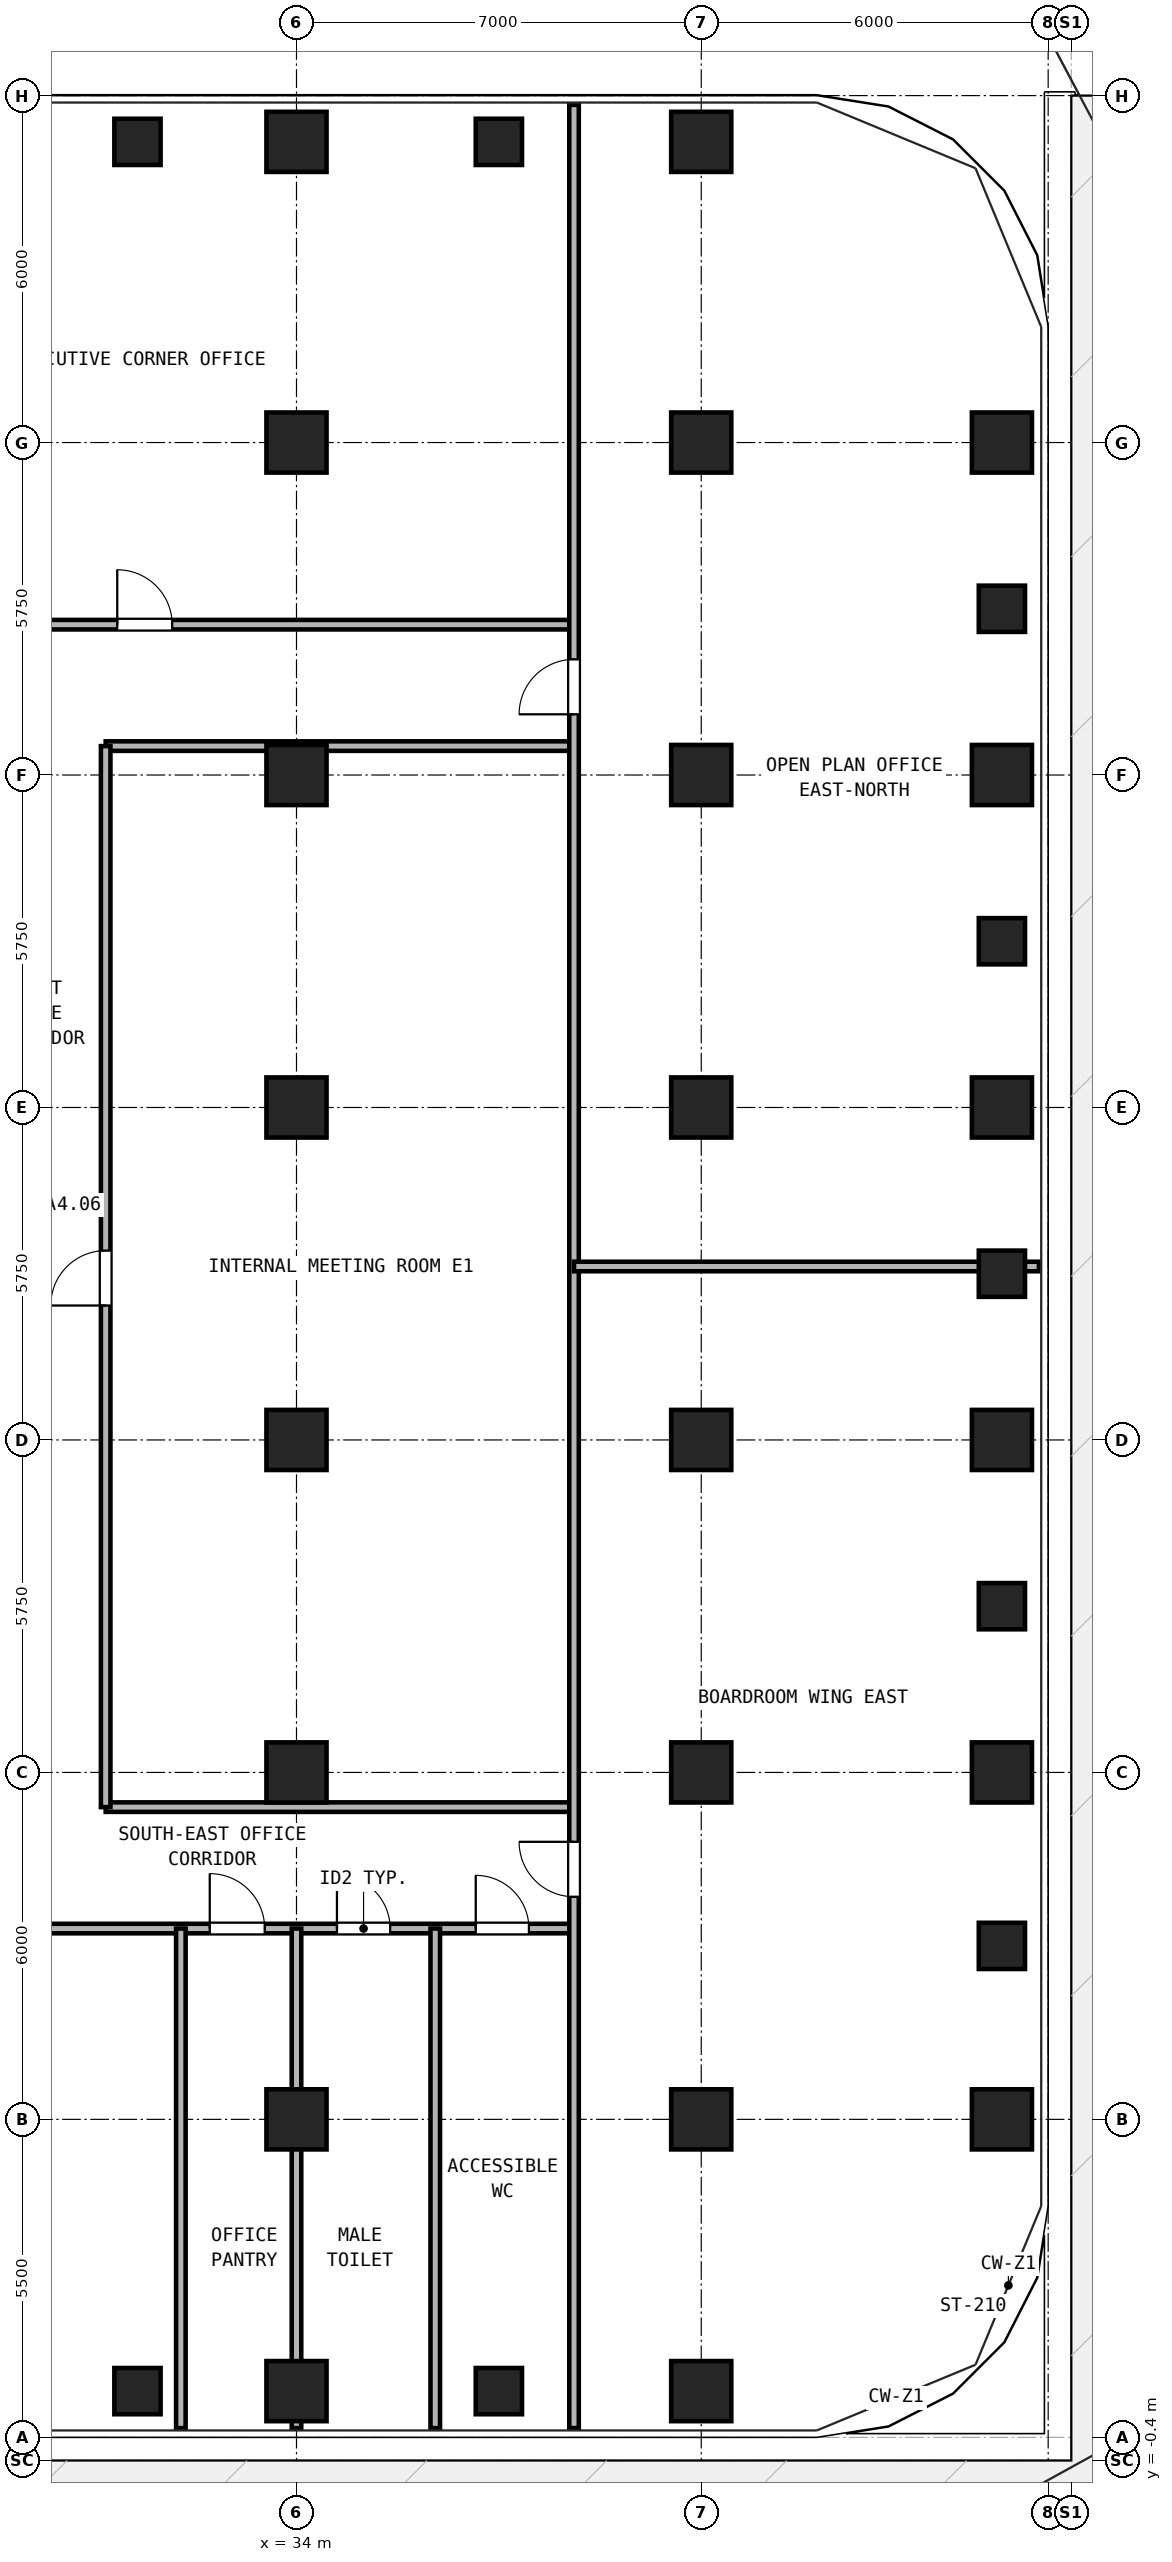
"""IFC4 building model, lengths in metres.
Left out: names, types, materials, properties, quantities, classifications, styles, units other than length and angle.
Written with IfcOpenShell. Run it as: python <this file> out.ifc"""

import sys

from ifc_helpers import new_model, si_unit, direction, frame, frame_2d, origin, origin_2d, place, context, subcontext, project, spatial, rectangle, hollow_rectangle, extrude, source, transform, mapped, element, fill, save


model = new_model("IFC4")
c1 = context("Model", 3, precision=1e-05, world=origin(), true_north=direction((0.0, 1.0)))
c2 = subcontext(c1, "Body", "Model", "MODEL_VIEW")
j1 = project(units=[si_unit("LENGTHUNIT", "METRE"), si_unit("PLANEANGLEUNIT", "RADIAN")], contexts=[c1])
p1 = place(None, origin())
s1 = spatial("IfcSite", under=j1, at=p1, CompositionType="ELEMENT")
p2 = place(p1, origin())
s2 = spatial("IfcBuilding", under=s1, at=p2, CompositionType="ELEMENT")
p3 = place(p2, frame((0.0, 0.0, 22.5)))
s3 = spatial("IfcBuildingStorey", under=s2, at=p3, CompositionType="ELEMENT", Elevation=22.5)
m1 = source(origin(), c2, "Body", "SweptSolid", [
    extrude(hollow_rectangle(XDim=1.04, YDim=1.04, WallThickness=0.065, at=origin_2d()), origin(), (0.0, 0.0, 1.0), 3.32),
])
for number, where, z_axis, x_axis in (
    (1, (34.0, 0.8, 0.0), (0.0, 0.0, 1.0), (1.0, 0.0, 0.0)),
    (2, (34.0, 39.7, 0.0), (0.0, 0.0, 1.0), (1.0, 0.0, 0.0)),
    (3, (41.0, 0.8, 0.0), (0.0, 0.0, 1.0), (1.0, 0.0, 0.0)),
    (4, (41.0, 39.7, 0.0), (0.0, 0.0, 1.0), (1.0, 0.0, 0.0)),
    (5, (46.2, 5.5, 0.0), (0.0, 0.0, 1.0), (1.0, 0.0, 0.0)),
    (6, (46.2, 11.5, 0.0), (0.0, 0.0, 1.0), (1.0, 0.0, 0.0)),
    (7, (46.2, 17.25, 0.0), (0.0, 0.0, 1.0), (1.0, 0.0, 0.0)),
    (8, (46.2, 23.0, 0.0), (0.0, 0.0, 1.0), (1.0, 0.0, 0.0)),
    (9, (46.2, 28.75, 0.0), (0.0, 0.0, 1.0), (1.0, 0.0, 0.0)),
    (10, (46.2, 34.5, 0.0), (0.0, 0.0, 1.0), (1.0, 0.0, 0.0)),
    (11, (34.0, 5.5, 0.0), (0.0, 0.0, 1.0), (1.0, 0.0, 0.0)),
    (12, (34.0, 11.5, 0.0), (0.0, 0.0, 1.0), (1.0, 0.0, 0.0)),
    (13, (34.0, 17.25, 0.0), (0.0, 0.0, 1.0), (1.0, 0.0, 0.0)),
    (14, (34.0, 23.0, 0.0), (0.0, 0.0, 1.0), (1.0, 0.0, 0.0)),
    (15, (34.0, 28.75, 0.0), (0.0, 0.0, 1.0), (1.0, 0.0, 0.0)),
    (16, (34.0, 34.5, 0.0), (0.0, 0.0, 1.0), (1.0, 0.0, 0.0)),
    (17, (41.0, 5.5, 0.0), (0.0, 0.0, 1.0), (1.0, 0.0, 0.0)),
    (18, (41.0, 11.5, 0.0), (0.0, 0.0, 1.0), (1.0, 0.0, 0.0)),
    (19, (41.0, 17.25, 0.0), (0.0, 0.0, 1.0), (1.0, 0.0, 0.0)),
    (20, (41.0, 23.0, 0.0), (0.0, 0.0, 1.0), (1.0, 0.0, 0.0)),
    (21, (41.0, 28.75, 0.0), (0.0, 0.0, 1.0), (1.0, 0.0, 0.0)),
    (22, (41.0, 34.5, 0.0), (0.0, 0.0, 1.0), (1.0, 0.0, 0.0)),
):
    element("IfcColumn", number, at=place(p3, frame(where, z_axis=z_axis, x_axis=x_axis)), inside=s3, PredefinedType="COLUMN", context=c2, shape_type="MappedRepresentation", body=[
        mapped(m1, transform((0.0, 0.0, 0.0), x_axis=(1.0, 0.0, 0.0), y_axis=(0.0, 1.0, 0.0), z_axis=(0.0, 0.0, 1.0), scale=1.0)),
    ])
m2 = source(origin(), c2, "Body", "SweptSolid", [
    extrude(hollow_rectangle(XDim=0.8, YDim=0.8, WallThickness=0.045, at=origin_2d()), origin(), (0.0, 0.0, 1.0), 3.68),
])
for number, where, z_axis, x_axis in (
    (23, (31.25, 0.8, -0.36), (0.0, 0.0, 1.0), (1.0, 0.0, 0.0)),
    (24, (31.25, 39.7, -0.36), (0.0, 0.0, 1.0), (1.0, 0.0, 0.0)),
    (25, (37.5, 0.8, -0.36), (0.0, 0.0, 1.0), (1.0, 0.0, 0.0)),
    (26, (37.5, 39.7, -0.36), (0.0, 0.0, 1.0), (1.0, 0.0, 0.0)),
    (27, (46.2, 8.5, -0.36), (0.0, 0.0, 1.0), (1.0, 0.0, 0.0)),
    (28, (46.2, 14.375, -0.36), (0.0, 0.0, 1.0), (1.0, 0.0, 0.0)),
    (29, (46.2, 20.125, -0.36), (0.0, 0.0, 1.0), (1.0, 0.0, 0.0)),
    (30, (46.2, 25.875, -0.36), (0.0, 0.0, 1.0), (1.0, 0.0, 0.0)),
    (31, (46.2, 31.625, -0.36), (0.0, 0.0, 1.0), (1.0, 0.0, 0.0)),
):
    element("IfcColumn", number, at=place(p3, frame(where, z_axis=z_axis, x_axis=x_axis)), inside=s3, PredefinedType="COLUMN", context=c2, shape_type="MappedRepresentation", body=[
        mapped(m2, transform((0.0, 0.0, 0.0), x_axis=(1.0, 0.0, 0.0), y_axis=(0.0, 1.0, 0.0), z_axis=(0.0, 0.0, 1.0), scale=1.0)),
    ])
p4 = place(p3, frame((8.2, 8.8, 0.0), z_axis=(0.0, 0.0, 1.0), x_axis=(1.0, 0.0, 0.0)))
e32 = element("IfcWall", 32, at=p4, inside=s3, PredefinedType="PARTITIONING", context=c2, shape_type="SweptSolid", body=[
    extrude(rectangle(XDim=30.6, YDim=0.165, at=frame_2d((15.3, 0.0))), origin(), (0.0, 0.0, 1.0), 3.32),
])
p5 = place(p4, frame((7.15, 0.0, 0.0)))
e33 = element("IfcOpeningElement", 33, at=p5, cuts=e32, PredefinedType="OPENING", context=c2, shape_type="SweptSolid", body=[
    extrude(rectangle(XDim=0.95, YDim=2.15, at=frame_2d((0.475, 1.075))), frame((0.0, 0.093, 0.0), z_axis=(0.0, -1.0, 0.0), x_axis=(1.0, 0.0, 0.0)), (0.0, 0.0, 1.0), 0.185),
])
p6 = place(p4, frame((19.05, 0.0, 0.0)))
e34 = element("IfcOpeningElement", 34, at=p6, cuts=e32, PredefinedType="OPENING", context=c2, shape_type="SweptSolid", body=[
    extrude(rectangle(XDim=0.95, YDim=2.15, at=frame_2d((0.475, 1.075))), frame((0.0, 0.093, 0.0), z_axis=(0.0, -1.0, 0.0), x_axis=(1.0, 0.0, 0.0)), (0.0, 0.0, 1.0), 0.185),
])
p7 = place(p4, frame((24.3, 0.0, 0.0)))
e35 = element("IfcOpeningElement", 35, at=p7, cuts=e32, PredefinedType="OPENING", context=c2, shape_type="SweptSolid", body=[
    extrude(rectangle(XDim=0.95, YDim=2.15, at=frame_2d((0.475, 1.075))), frame((0.0, 0.093, 0.0), z_axis=(0.0, -1.0, 0.0), x_axis=(1.0, 0.0, 0.0)), (0.0, 0.0, 1.0), 0.185),
])
p8 = place(p4, frame((26.5, 0.0, 0.0)))
e36 = element("IfcOpeningElement", 36, at=p8, cuts=e32, PredefinedType="OPENING", context=c2, shape_type="SweptSolid", body=[
    extrude(rectangle(XDim=0.92, YDim=2.1, at=frame_2d((0.46, 1.05))), frame((0.0, 0.093, 0.0), z_axis=(0.0, -1.0, 0.0), x_axis=(1.0, 0.0, 0.0)), (0.0, 0.0, 1.0), 0.185),
])
p9 = place(p4, frame((28.9, 0.0, 0.0)))
e37 = element("IfcOpeningElement", 37, at=p9, cuts=e32, PredefinedType="OPENING", context=c2, shape_type="SweptSolid", body=[
    extrude(rectangle(XDim=0.92, YDim=2.1, at=frame_2d((0.46, 1.05))), frame((0.0, 0.093, 0.0), z_axis=(0.0, -1.0, 0.0), x_axis=(1.0, 0.0, 0.0)), (0.0, 0.0, 1.0), 0.185),
])
p10 = place(p3, frame((8.2, 31.35, 0.0), z_axis=(0.0, 0.0, 1.0), x_axis=(1.0, 0.0, 0.0)))
e38 = element("IfcWall", 38, at=p10, inside=s3, PredefinedType="PARTITIONING", context=c2, shape_type="SweptSolid", body=[
    extrude(rectangle(XDim=30.6, YDim=0.165, at=frame_2d((15.3, 0.0))), origin(), (0.0, 0.0, 1.0), 3.32),
])
p11 = place(p10, frame((7.4, 0.0, 0.0)))
e39 = element("IfcOpeningElement", 39, at=p11, cuts=e38, PredefinedType="OPENING", context=c2, shape_type="SweptSolid", body=[
    extrude(rectangle(XDim=0.95, YDim=2.15, at=frame_2d((0.475, 1.075))), frame((0.0, 0.093, 0.0), z_axis=(0.0, -1.0, 0.0), x_axis=(1.0, 0.0, 0.0)), (0.0, 0.0, 1.0), 0.185),
])
p12 = place(p10, frame((22.7, 0.0, 0.0)))
e40 = element("IfcOpeningElement", 40, at=p12, cuts=e38, PredefinedType="OPENING", context=c2, shape_type="SweptSolid", body=[
    extrude(rectangle(XDim=0.95, YDim=2.15, at=frame_2d((0.475, 1.075))), frame((0.0, 0.093, 0.0), z_axis=(0.0, -1.0, 0.0), x_axis=(1.0, 0.0, 0.0)), (0.0, 0.0, 1.0), 0.185),
])
for number, where, z_axis, x_axis in (
    (41, (30.7, 10.9, 0.0), (0.0, 0.0, 1.0), (1.0, 0.0, 0.0)),
    (42, (30.7, 29.25, 0.0), (0.0, 0.0, 1.0), (1.0, 0.0, 0.0)),
):
    element("IfcWall", number, at=place(p3, frame(where, z_axis=z_axis, x_axis=x_axis)), inside=s3, PredefinedType="PARTITIONING", context=c2, shape_type="SweptSolid", body=[
        extrude(rectangle(XDim=8.1, YDim=0.165, at=frame_2d((4.05, 0.0))), origin(), (0.0, 0.0, 1.0), 3.32),
    ])
p13 = place(p3, frame((30.7, 10.9, 0.0), z_axis=(0.0, 0.0, 1.0), x_axis=(0.0, 1.0, 0.0)))
e43 = element("IfcWall", 43, at=p13, inside=s3, PredefinedType="PARTITIONING", context=c2, shape_type="SweptSolid", body=[
    extrude(rectangle(XDim=18.35, YDim=0.165, at=frame_2d((9.175, 0.0))), origin(), (0.0, 0.0, 1.0), 3.32),
])
p14 = place(p13, frame((8.675, 0.0, 0.0)))
e44 = element("IfcOpeningElement", 44, at=p14, cuts=e43, PredefinedType="OPENING", context=c2, shape_type="SweptSolid", body=[
    extrude(rectangle(XDim=0.95, YDim=2.15, at=frame_2d((0.475, 1.075))), frame((0.0, 0.093, 0.0), z_axis=(0.0, -1.0, 0.0), x_axis=(1.0, 0.0, 0.0)), (0.0, 0.0, 1.0), 0.185),
])
p15 = place(p3, frame((38.8, 0.16, 0.0), z_axis=(0.0, 0.0, 1.0), x_axis=(0.0, 1.0, 0.0)))
e45 = element("IfcWall", 45, at=p15, inside=s3, PredefinedType="PARTITIONING", context=c2, shape_type="SweptSolid", body=[
    extrude(rectangle(XDim=40.18, YDim=0.165, at=frame_2d((20.09, 0.0))), origin(), (0.0, 0.0, 1.0), 3.32),
])
p16 = place(p15, frame((9.19, 0.0, 0.0)))
e46 = element("IfcOpeningElement", 46, at=p16, cuts=e45, PredefinedType="OPENING", context=c2, shape_type="SweptSolid", body=[
    extrude(rectangle(XDim=0.95, YDim=2.15, at=frame_2d((0.475, 1.075))), frame((0.0, 0.093, 0.0), z_axis=(0.0, -1.0, 0.0), x_axis=(1.0, 0.0, 0.0)), (0.0, 0.0, 1.0), 0.185),
])
p17 = place(p15, frame((29.64, 0.0, 0.0)))
e47 = element("IfcOpeningElement", 47, at=p17, cuts=e45, PredefinedType="OPENING", context=c2, shape_type="SweptSolid", body=[
    extrude(rectangle(XDim=0.95, YDim=2.15, at=frame_2d((0.475, 1.075))), frame((0.0, 0.093, 0.0), z_axis=(0.0, -1.0, 0.0), x_axis=(1.0, 0.0, 0.0)), (0.0, 0.0, 1.0), 0.185),
])
p18 = place(p3, frame((32.0, 0.16, 0.0), z_axis=(0.0, 0.0, 1.0), x_axis=(0.0, 1.0, 0.0)))
e48 = element("IfcWall", 48, at=p18, inside=s3, PredefinedType="PARTITIONING", context=c2, shape_type="SweptSolid", body=[
    extrude(rectangle(XDim=8.64, YDim=0.165, at=frame_2d((4.32, 0.0))), origin(), (0.0, 0.0, 1.0), 3.32),
])
p19 = place(p3, frame((34.0, 0.16, 0.0), z_axis=(0.0, 0.0, 1.0), x_axis=(0.0, 1.0, 0.0)))
e49 = element("IfcWall", 49, at=p19, inside=s3, PredefinedType="PARTITIONING", context=c2, shape_type="SweptSolid", body=[
    extrude(rectangle(XDim=8.64, YDim=0.165, at=frame_2d((4.32, 0.0))), origin(), (0.0, 0.0, 1.0), 2.539),
])
p20 = place(p3, frame((36.4, 0.16, 0.0), z_axis=(0.0, 0.0, 1.0), x_axis=(0.0, 1.0, 0.0)))
e50 = element("IfcWall", 50, at=p20, inside=s3, PredefinedType="PARTITIONING", context=c2, shape_type="SweptSolid", body=[
    extrude(rectangle(XDim=8.64, YDim=0.165, at=frame_2d((4.32, 0.0))), origin(), (0.0, 0.0, 1.0), 3.32),
])
p21 = place(p3, frame((38.8, 20.25, 0.0), z_axis=(0.0, 0.0, 1.0), x_axis=(1.0, 0.0, 0.0)))
e51 = element("IfcWall", 51, at=p21, inside=s3, PredefinedType="PARTITIONING", context=c2, shape_type="SweptSolid", body=[
    extrude(rectangle(XDim=8.04, YDim=0.165, at=frame_2d((4.02, 0.0))), origin(), (0.0, 0.0, 1.0), 2.898),
])
p22 = place(p7, frame((0.95, 0.0, 0.0), z_axis=(0.0, 0.0, 1.0), x_axis=(-1.0, 0.0, 0.0)))
e52 = element("IfcDoor", 52, at=p22, inside=s3, OperationType="SINGLE_SWING_LEFT", PredefinedType="DOOR", context=c2, shape_type="SweptSolid", body=[
    extrude(rectangle(XDim=0.95, YDim=2.15, at=frame_2d((0.475, 1.075))), frame((0.0, 0.025, 0.0), z_axis=(0.0, -1.0, 0.0), x_axis=(1.0, 0.0, 0.0)), (0.0, 0.0, 1.0), 0.05),
])
fill(e35, e52)
p23 = place(p8, frame((0.92, 0.0, 0.0), z_axis=(0.0, 0.0, 1.0), x_axis=(-1.0, 0.0, 0.0)))
e53 = element("IfcDoor", 53, at=p23, inside=s3, OperationType="SINGLE_SWING_LEFT", PredefinedType="DOOR", context=c2, shape_type="SweptSolid", body=[
    extrude(rectangle(XDim=0.92, YDim=2.1, at=frame_2d((0.46, 1.05))), frame((0.0, 0.025, 0.0), z_axis=(0.0, -1.0, 0.0), x_axis=(1.0, 0.0, 0.0)), (0.0, 0.0, 1.0), 0.05),
])
fill(e36, e53)
p24 = place(p9, frame((0.92, 0.0, 0.0), z_axis=(0.0, 0.0, 1.0), x_axis=(-1.0, 0.0, 0.0)))
e54 = element("IfcDoor", 54, at=p24, inside=s3, OperationType="SINGLE_SWING_LEFT", PredefinedType="DOOR", context=c2, shape_type="SweptSolid", body=[
    extrude(rectangle(XDim=0.92, YDim=2.1, at=frame_2d((0.46, 1.05))), frame((0.0, 0.025, 0.0), z_axis=(0.0, -1.0, 0.0), x_axis=(1.0, 0.0, 0.0)), (0.0, 0.0, 1.0), 0.05),
])
fill(e37, e54)
p25 = place(p12, origin())
e55 = element("IfcDoor", 55, at=p25, inside=s3, OperationType="SINGLE_SWING_LEFT", PredefinedType="DOOR", context=c2, shape_type="SweptSolid", body=[
    extrude(rectangle(XDim=0.95, YDim=2.15, at=frame_2d((0.475, 1.075))), frame((0.0, 0.025, 0.0), z_axis=(0.0, -1.0, 0.0), x_axis=(1.0, 0.0, 0.0)), (0.0, 0.0, 1.0), 0.05),
])
fill(e40, e55)
p26 = place(p16, origin())
e56 = element("IfcDoor", 56, at=p26, inside=s3, OperationType="SINGLE_SWING_RIGHT", PredefinedType="DOOR", context=c2, shape_type="SweptSolid", body=[
    extrude(rectangle(XDim=0.95, YDim=2.15, at=frame_2d((0.475, 1.075))), frame((0.0, 0.025, 0.0), z_axis=(0.0, -1.0, 0.0), x_axis=(1.0, 0.0, 0.0)), (0.0, 0.0, 1.0), 0.05),
])
fill(e46, e56)
p27 = place(p17, origin())
e57 = element("IfcDoor", 57, at=p27, inside=s3, OperationType="SINGLE_SWING_LEFT", PredefinedType="DOOR", context=c2, shape_type="SweptSolid", body=[
    extrude(rectangle(XDim=0.95, YDim=2.15, at=frame_2d((0.475, 1.075))), frame((0.0, 0.025, 0.0), z_axis=(0.0, -1.0, 0.0), x_axis=(1.0, 0.0, 0.0)), (0.0, 0.0, 1.0), 0.05),
])
fill(e47, e57)
p28 = place(p14, origin())
e58 = element("IfcDoor", 58, at=p28, inside=s3, OperationType="SINGLE_SWING_LEFT", PredefinedType="DOOR", context=c2, shape_type="SweptSolid", body=[
    extrude(rectangle(XDim=0.95, YDim=2.15, at=frame_2d((0.475, 1.075))), frame((0.0, 0.025, 0.0), z_axis=(0.0, -1.0, 0.0), x_axis=(1.0, 0.0, 0.0)), (0.0, 0.0, 1.0), 0.05),
])
fill(e44, e58)
save(model, sys.argv[1])
